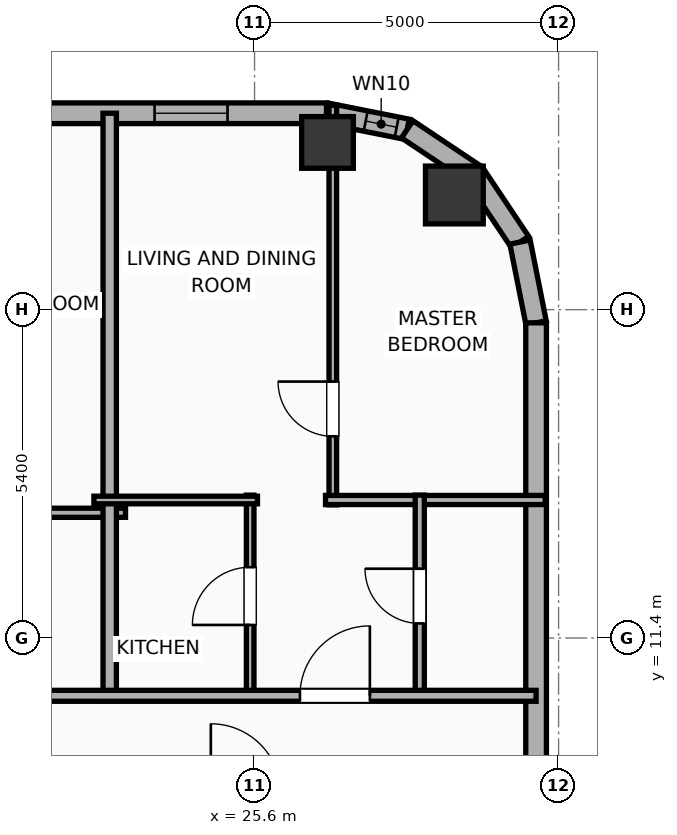
"""IFC4 building model, lengths in metres.
Left out: names, types, materials, properties, quantities, classifications, styles, units other than length and angle.
Written with IfcOpenShell. Run it as: python <this file> out.ifc"""

import sys

from ifc_helpers import new_model, si_unit, direction, frame, frame_2d, origin, origin_2d, place, context, subcontext, project, spatial, rectangle, hollow_rectangle, hollow_circle, extrude, element, fill, save


model = new_model("IFC4")
c1 = context("Model", 3, precision=1e-05, world=origin(), true_north=direction((0.0, 1.0)))
c2 = subcontext(c1, "Body", "Model", "MODEL_VIEW")
j1 = project(units=[si_unit("LENGTHUNIT", "METRE"), si_unit("PLANEANGLEUNIT", "RADIAN")], contexts=[c1])
p1 = place(None, origin())
s1 = spatial("IfcSite", under=j1, at=p1, CompositionType="ELEMENT")
p2 = place(p1, origin())
s2 = spatial("IfcBuilding", under=s1, at=p2, CompositionType="ELEMENT")
p3 = place(p2, frame((0.0, 0.0, 204.1)))
s3 = spatial("IfcBuildingStorey", under=s2, at=p3, CompositionType="ELEMENT", Elevation=204.1)
p4 = place(p3, frame((28.886, 18.686, 0.0), z_axis=(0.0, 0.0, 1.0), x_axis=(1.0, 0.0, 0.0)))
e1 = element("IfcColumn", 1, at=p4, inside=s3, PredefinedType="COLUMN", context=c2, shape_type="SweptSolid", body=[
    extrude(hollow_circle(Radius=0.475, WallThickness=0.032, at=origin_2d()), origin(), (0.0, 0.0, 1.0), 3.9),
])
p5 = place(p3, frame((26.8, 19.55, 0.0), z_axis=(0.0, 0.0, 1.0), x_axis=(1.0, 0.0, 0.0)))
e2 = element("IfcColumn", 2, at=p5, inside=s3, PredefinedType="COLUMN", context=c2, shape_type="SweptSolid", body=[
    extrude(hollow_rectangle(XDim=0.85, YDim=0.85, WallThickness=0.028, at=origin_2d()), origin(), (0.0, 0.0, 1.0), 3.9),
])
p6 = place(p3, frame((-22.783, 20.03, 0.0), z_axis=(0.0, 0.0, 1.0), x_axis=(1.0, 0.0, 0.0)))
e3 = element("IfcWall", 3, at=p6, inside=s3, PredefinedType="ELEMENTEDWALL", context=c2, shape_type="SweptSolid", body=[
    extrude(rectangle(XDim=49.566, YDim=0.34, at=frame_2d((24.783, 0.0))), origin(), (0.0, 0.0, 1.0), 3.65),
])
p7 = place(p6, frame((6.211, 0.0, 0.75)))
e4 = element("IfcOpeningElement", 4, at=p7, cuts=e3, PredefinedType="OPENING", context=c2, shape_type="SweptSolid", body=[
    extrude(rectangle(XDim=2.4, YDim=2.1, at=frame_2d((1.2, 1.05))), frame((0.0, 0.18, 0.0), z_axis=(0.0, -1.0, 0.0), x_axis=(1.0, 0.0, 0.0)), (0.0, 0.0, 1.0), 0.36),
])
p8 = place(p6, frame((22.733, 0.0, 0.75)))
e5 = element("IfcOpeningElement", 5, at=p8, cuts=e3, PredefinedType="OPENING", context=c2, shape_type="SweptSolid", body=[
    extrude(rectangle(XDim=2.4, YDim=2.1, at=frame_2d((1.2, 1.05))), frame((0.0, 0.18, 0.0), z_axis=(0.0, -1.0, 0.0), x_axis=(1.0, 0.0, 0.0)), (0.0, 0.0, 1.0), 0.36),
])
p9 = place(p6, frame((1.132, 0.0, 0.75)))
e6 = element("IfcOpeningElement", 6, at=p9, cuts=e3, PredefinedType="OPENING", context=c2, shape_type="SweptSolid", body=[
    extrude(rectangle(XDim=1.2, YDim=2.05, at=frame_2d((0.6, 1.025))), frame((0.0, 0.18, 0.0), z_axis=(0.0, -1.0, 0.0), x_axis=(1.0, 0.0, 0.0)), (0.0, 0.0, 1.0), 0.36),
])
p10 = place(p6, frame((3.678, 0.0, 0.75)))
e7 = element("IfcOpeningElement", 7, at=p10, cuts=e3, PredefinedType="OPENING", context=c2, shape_type="SweptSolid", body=[
    extrude(rectangle(XDim=1.2, YDim=2.05, at=frame_2d((0.6, 1.025))), frame((0.0, 0.18, 0.0), z_axis=(0.0, -1.0, 0.0), x_axis=(1.0, 0.0, 0.0)), (0.0, 0.0, 1.0), 0.36),
])
p11 = place(p6, frame((14.804, 0.0, 0.75)))
e8 = element("IfcOpeningElement", 8, at=p11, cuts=e3, PredefinedType="OPENING", context=c2, shape_type="SweptSolid", body=[
    extrude(rectangle(XDim=1.2, YDim=2.05, at=frame_2d((0.6, 1.025))), frame((0.0, 0.18, 0.0), z_axis=(0.0, -1.0, 0.0), x_axis=(1.0, 0.0, 0.0)), (0.0, 0.0, 1.0), 0.36),
])
p12 = place(p6, frame((12.054, 0.0, 0.75)))
e9 = element("IfcOpeningElement", 9, at=p12, cuts=e3, PredefinedType="OPENING", context=c2, shape_type="SweptSolid", body=[
    extrude(rectangle(XDim=1.2, YDim=2.05, at=frame_2d((0.6, 1.025))), frame((0.0, 0.18, 0.0), z_axis=(0.0, -1.0, 0.0), x_axis=(1.0, 0.0, 0.0)), (0.0, 0.0, 1.0), 0.36),
])
p13 = place(p6, frame((17.933, 0.0, 0.75)))
e10 = element("IfcOpeningElement", 10, at=p13, cuts=e3, PredefinedType="OPENING", context=c2, shape_type="SweptSolid", body=[
    extrude(rectangle(XDim=1.2, YDim=2.05, at=frame_2d((0.6, 1.025))), frame((0.0, 0.18, 0.0), z_axis=(0.0, -1.0, 0.0), x_axis=(1.0, 0.0, 0.0)), (0.0, 0.0, 1.0), 0.36),
])
p14 = place(p6, frame((26.278, 0.0, 0.75)))
e11 = element("IfcOpeningElement", 11, at=p14, cuts=e3, PredefinedType="OPENING", context=c2, shape_type="SweptSolid", body=[
    extrude(rectangle(XDim=1.2, YDim=2.05, at=frame_2d((0.6, 1.025))), frame((0.0, 0.18, 0.0), z_axis=(0.0, -1.0, 0.0), x_axis=(1.0, 0.0, 0.0)), (0.0, 0.0, 1.0), 0.36),
])
p15 = place(p6, frame((32.677, 0.0, 0.75)))
e12 = element("IfcOpeningElement", 12, at=p15, cuts=e3, PredefinedType="OPENING", context=c2, shape_type="SweptSolid", body=[
    extrude(rectangle(XDim=1.2, YDim=2.05, at=frame_2d((0.6, 1.025))), frame((0.0, 0.18, 0.0), z_axis=(0.0, -1.0, 0.0), x_axis=(1.0, 0.0, 0.0)), (0.0, 0.0, 1.0), 0.36),
])
p16 = place(p6, frame((28.217, 0.0, 0.75)))
e13 = element("IfcOpeningElement", 13, at=p16, cuts=e3, PredefinedType="OPENING", context=c2, shape_type="SweptSolid", body=[
    extrude(rectangle(XDim=0.85, YDim=2.05, at=frame_2d((0.425, 1.025))), frame((0.0, 0.18, 0.0), z_axis=(0.0, -1.0, 0.0), x_axis=(1.0, 0.0, 0.0)), (0.0, 0.0, 1.0), 0.36),
])
p17 = place(p6, frame((36.678, 0.0, 0.75)))
e14 = element("IfcOpeningElement", 14, at=p17, cuts=e3, PredefinedType="OPENING", context=c2, shape_type="SweptSolid", body=[
    extrude(rectangle(XDim=1.2, YDim=2.05, at=frame_2d((0.6, 1.025))), frame((0.0, 0.18, 0.0), z_axis=(0.0, -1.0, 0.0), x_axis=(1.0, 0.0, 0.0)), (0.0, 0.0, 1.0), 0.36),
])
p18 = place(p6, frame((40.307, 0.0, 0.75)))
e15 = element("IfcOpeningElement", 15, at=p18, cuts=e3, PredefinedType="OPENING", context=c2, shape_type="SweptSolid", body=[
    extrude(rectangle(XDim=1.2, YDim=2.05, at=frame_2d((0.6, 1.025))), frame((0.0, 0.18, 0.0), z_axis=(0.0, -1.0, 0.0), x_axis=(1.0, 0.0, 0.0)), (0.0, 0.0, 1.0), 0.36),
])
p19 = place(p6, frame((43.696, 0.0, 0.75)))
e16 = element("IfcOpeningElement", 16, at=p19, cuts=e3, PredefinedType="OPENING", context=c2, shape_type="SweptSolid", body=[
    extrude(rectangle(XDim=1.2, YDim=2.05, at=frame_2d((0.6, 1.025))), frame((0.0, 0.18, 0.0), z_axis=(0.0, -1.0, 0.0), x_axis=(1.0, 0.0, 0.0)), (0.0, 0.0, 1.0), 0.36),
])
p20 = place(p6, frame((46.739, 0.0, 0.75)))
e17 = element("IfcOpeningElement", 17, at=p20, cuts=e3, PredefinedType="OPENING", context=c2, shape_type="SweptSolid", body=[
    extrude(rectangle(XDim=1.2, YDim=2.05, at=frame_2d((0.6, 1.025))), frame((0.0, 0.18, 0.0), z_axis=(0.0, -1.0, 0.0), x_axis=(1.0, 0.0, 0.0)), (0.0, 0.0, 1.0), 0.36),
])
p21 = place(p3, frame((26.783, 20.03, 0.0), z_axis=(0.0, 0.0, 1.0), x_axis=(0.980788153188, -0.195075878998, 0.0)))
e18 = element("IfcWall", 18, at=p21, inside=s3, PredefinedType="ELEMENTEDWALL", context=c2, shape_type="SweptSolid", body=[
    extrude(rectangle(XDim=1.354, YDim=0.34, at=frame_2d((0.677, 0.0))), origin(), (0.0, 0.0, 1.0), 3.65),
])
p22 = place(p21, frame((0.657, 0.0, 0.75)))
e19 = element("IfcOpeningElement", 19, at=p22, cuts=e18, PredefinedType="OPENING", context=c2, shape_type="SweptSolid", body=[
    extrude(rectangle(XDim=0.52, YDim=2.05, at=frame_2d((0.26, 1.025))), frame((0.0, 0.18, 0.0), z_axis=(0.0, -1.0, 0.0), x_axis=(1.0, 0.0, 0.0)), (0.0, 0.0, 1.0), 0.36),
])
for number, where, z_axis, x_axis in (
    (20, (28.111, 19.766, 0.0), (0.0, 0.0, 1.0), (0.831, -0.556, 0.0)),
    (21, (29.223, 19.023, 0.0), (0.0, 0.0, 1.0), (0.556, -0.831, 0.0)),
):
    element("IfcWall", number, at=place(p3, frame(where, z_axis=z_axis, x_axis=x_axis)), inside=s3, PredefinedType="ELEMENTEDWALL", context=c2, shape_type="SweptSolid", body=[
        extrude(rectangle(XDim=1.337, YDim=0.34, at=frame_2d((0.668, 0.0))), origin(), (0.0, 0.0, 1.0), 3.65),
    ])
p23 = place(p3, frame((29.966, 17.911, 0.0), z_axis=(0.0, 0.0, 1.0), x_axis=(0.195075878998, -0.980788153188, 0.0)))
e22 = element("IfcWall", 22, at=p23, inside=s3, PredefinedType="ELEMENTEDWALL", context=c2, shape_type="SweptSolid", body=[
    extrude(rectangle(XDim=1.354, YDim=0.34, at=frame_2d((0.677, 0.0))), origin(), (0.0, 0.0, 1.0), 3.65),
])
p24 = place(p3, frame((30.23, 16.583, 0.0), z_axis=(0.0, 0.0, 1.0), x_axis=(0.0, -1.0, 0.0)))
e23 = element("IfcWall", 23, at=p24, inside=s3, PredefinedType="ELEMENTEDWALL", context=c2, shape_type="SweptSolid", body=[
    extrude(rectangle(XDim=31.967, YDim=0.34, at=frame_2d((15.983, 0.0))), origin(), (0.0, 0.0, 1.0), 3.65),
])
p25 = place(p24, frame((29.924, 0.0, 0.75)))
e24 = element("IfcOpeningElement", 24, at=p25, cuts=e23, PredefinedType="OPENING", context=c2, shape_type="SweptSolid", body=[
    extrude(rectangle(XDim=1.2, YDim=2.05, at=frame_2d((0.6, 1.025))), frame((0.0, 0.18, 0.0), z_axis=(0.0, -1.0, 0.0), x_axis=(1.0, 0.0, 0.0)), (0.0, 0.0, 1.0), 0.36),
])
p26 = place(p24, frame((11.463, 0.0, 0.75)))
e25 = element("IfcOpeningElement", 25, at=p26, cuts=e23, PredefinedType="OPENING", context=c2, shape_type="SweptSolid", body=[
    extrude(rectangle(XDim=1.2, YDim=2.05, at=frame_2d((0.6, 1.025))), frame((0.0, 0.18, 0.0), z_axis=(0.0, -1.0, 0.0), x_axis=(1.0, 0.0, 0.0)), (0.0, 0.0, 1.0), 0.36),
])
p27 = place(p24, frame((20.363, 0.0, 0.75)))
e26 = element("IfcOpeningElement", 26, at=p27, cuts=e23, PredefinedType="OPENING", context=c2, shape_type="SweptSolid", body=[
    extrude(rectangle(XDim=1.2, YDim=2.05, at=frame_2d((0.6, 1.025))), frame((0.0, 0.18, 0.0), z_axis=(0.0, -1.0, 0.0), x_axis=(1.0, 0.0, 0.0)), (0.0, 0.0, 1.0), 0.36),
])
p28 = place(p3, frame((19.688, 13.46, 0.0), z_axis=(0.0, 0.0, 1.0), x_axis=(1.0, 0.0, 0.0)))
e27 = element("IfcWall", 27, at=p28, inside=s3, PredefinedType="PLUMBINGWALL", context=c2, shape_type="SweptSolid", body=[
    extrude(rectangle(XDim=3.79, YDim=0.15, at=frame_2d((1.895, 0.0))), origin(), (0.0, 0.0, 1.0), 3.65),
])
p29 = place(p3, frame((23.218, 10.37, 0.0), z_axis=(0.0, 0.0, 1.0), x_axis=(0.0, 1.0, 0.0)))
e28 = element("IfcWall", 28, at=p29, inside=s3, PredefinedType="PARTITIONING", context=c2, shape_type="SweptSolid", body=[
    extrude(rectangle(XDim=9.66, YDim=0.22, at=frame_2d((4.83, 0.0))), origin(), (0.0, 0.0, 1.0), 3.65),
])
p30 = place(p3, frame((26.887, 13.59, 0.0), z_axis=(0.0, 0.0, 1.0), x_axis=(0.0, 1.0, 0.0)))
e29 = element("IfcWall", 29, at=p30, inside=s3, PredefinedType="PARTITIONING", context=c2, shape_type="SweptSolid", body=[
    extrude(rectangle(XDim=6.572, YDim=0.125, at=frame_2d((3.286, 0.0))), origin(), (0.0, 0.0, 1.0), 3.65),
])
p31 = place(p30, frame((1.127, 0.0, 0.0)))
e30 = element("IfcOpeningElement", 30, at=p31, cuts=e29, PredefinedType="OPENING", context=c2, shape_type="SweptSolid", body=[
    extrude(rectangle(XDim=0.9, YDim=2.05, at=frame_2d((0.45, 1.025))), frame((0.0, 0.073, 0.0), z_axis=(0.0, -1.0, 0.0), x_axis=(1.0, 0.0, 0.0)), (0.0, 0.0, 1.0), 0.145),
])
p32 = place(p3, frame((26.767, 13.67, 0.0), z_axis=(0.0, 0.0, 1.0), x_axis=(1.0, 0.0, 0.0)))
e31 = element("IfcWall", 31, at=p32, inside=s3, PredefinedType="PLUMBINGWALL", context=c2, shape_type="SweptSolid", body=[
    extrude(rectangle(XDim=3.613, YDim=0.15, at=frame_2d((1.806, 0.0))), origin(), (0.0, 0.0, 1.0), 3.65),
])
p33 = place(p3, frame((25.528, 10.43, 0.0), z_axis=(0.0, 0.0, 1.0), x_axis=(0.0, 1.0, 0.0)))
e32 = element("IfcWall", 32, at=p33, inside=s3, PredefinedType="PARTITIONING", context=c2, shape_type="SweptSolid", body=[
    extrude(rectangle(XDim=3.32, YDim=0.125, at=frame_2d((1.66, 0.0))), origin(), (0.0, 0.0, 1.0), 3.65),
])
p34 = place(p33, frame((1.185, 0.0, 0.0)))
e33 = element("IfcOpeningElement", 33, at=p34, cuts=e32, PredefinedType="OPENING", context=c2, shape_type="SweptSolid", body=[
    extrude(rectangle(XDim=0.95, YDim=2.05, at=frame_2d((0.475, 1.025))), frame((0.0, 0.073, 0.0), z_axis=(0.0, -1.0, 0.0), x_axis=(1.0, 0.0, 0.0)), (0.0, 0.0, 1.0), 0.145),
])
p35 = place(p3, frame((22.958, 13.67, 0.0), z_axis=(0.0, 0.0, 1.0), x_axis=(1.0, 0.0, 0.0)))
e34 = element("IfcWall", 34, at=p35, inside=s3, PredefinedType="PARTITIONING", context=c2, shape_type="SweptSolid", body=[
    extrude(rectangle(XDim=2.69, YDim=0.125, at=frame_2d((1.345, 0.0))), origin(), (0.0, 0.0, 1.0), 3.65),
])
p36 = place(p3, frame((28.317, 10.43, 0.0), z_axis=(0.0, 0.0, 1.0), x_axis=(0.0, 1.0, 0.0)))
e35 = element("IfcWall", 35, at=p36, inside=s3, PredefinedType="PLUMBINGWALL", context=c2, shape_type="SweptSolid", body=[
    extrude(rectangle(XDim=3.32, YDim=0.15, at=frame_2d((1.66, 0.0))), origin(), (0.0, 0.0, 1.0), 3.65),
])
p37 = place(p36, frame((1.21, 0.0, 0.0)))
e36 = element("IfcOpeningElement", 36, at=p37, cuts=e35, PredefinedType="OPENING", context=c2, shape_type="SweptSolid", body=[
    extrude(rectangle(XDim=0.9, YDim=2.05, at=frame_2d((0.45, 1.025))), frame((0.0, 0.085, 0.0), z_axis=(0.0, -1.0, 0.0), x_axis=(1.0, 0.0, 0.0)), (0.0, 0.0, 1.0), 0.17),
])
p38 = place(p3, frame((-26.23, 10.45, 0.0), z_axis=(0.0, 0.0, 1.0), x_axis=(1.0, 0.0, 0.0)))
e37 = element("IfcWall", 37, at=p38, inside=s3, PredefinedType="PARTITIONING", context=c2, shape_type="SweptSolid", body=[
    extrude(rectangle(XDim=56.46, YDim=0.18, at=frame_2d((28.23, 0.0))), origin(), (0.0, 0.0, 1.0), 3.65),
])
p39 = place(p38, frame((4.41, 0.0, 0.0)))
e38 = element("IfcOpeningElement", 38, at=p39, cuts=e37, PredefinedType="OPENING", context=c2, shape_type="SweptSolid", body=[
    extrude(rectangle(XDim=1.15, YDim=2.05, at=frame_2d((0.575, 1.025))), frame((0.0, 0.1, 0.0), z_axis=(0.0, -1.0, 0.0), x_axis=(1.0, 0.0, 0.0)), (0.0, 0.0, 1.0), 0.2),
])
p40 = place(p38, frame((11.943, 0.0, 0.0)))
e39 = element("IfcOpeningElement", 39, at=p40, cuts=e37, PredefinedType="OPENING", context=c2, shape_type="SweptSolid", body=[
    extrude(rectangle(XDim=0.9, YDim=2.05, at=frame_2d((0.45, 1.025))), frame((0.0, 0.1, 0.0), z_axis=(0.0, -1.0, 0.0), x_axis=(1.0, 0.0, 0.0)), (0.0, 0.0, 1.0), 0.2),
])
p41 = place(p38, frame((18.243, 0.0, 0.0)))
e40 = element("IfcOpeningElement", 40, at=p41, cuts=e37, PredefinedType="OPENING", context=c2, shape_type="SweptSolid", body=[
    extrude(rectangle(XDim=1.15, YDim=2.05, at=frame_2d((0.575, 1.025))), frame((0.0, 0.1, 0.0), z_axis=(0.0, -1.0, 0.0), x_axis=(1.0, 0.0, 0.0)), (0.0, 0.0, 1.0), 0.2),
])
p42 = place(p38, frame((22.941, 0.0, 0.0)))
e41 = element("IfcOpeningElement", 41, at=p42, cuts=e37, PredefinedType="OPENING", context=c2, shape_type="SweptSolid", body=[
    extrude(rectangle(XDim=0.9, YDim=2.05, at=frame_2d((0.45, 1.025))), frame((0.0, 0.1, 0.0), z_axis=(0.0, -1.0, 0.0), x_axis=(1.0, 0.0, 0.0)), (0.0, 0.0, 1.0), 0.2),
])
p43 = place(p38, frame((27.028, 0.0, 0.0)))
e42 = element("IfcOpeningElement", 42, at=p43, cuts=e37, PredefinedType="OPENING", context=c2, shape_type="SweptSolid", body=[
    extrude(rectangle(XDim=1.15, YDim=2.05, at=frame_2d((0.575, 1.025))), frame((0.0, 0.1, 0.0), z_axis=(0.0, -1.0, 0.0), x_axis=(1.0, 0.0, 0.0)), (0.0, 0.0, 1.0), 0.2),
])
p44 = place(p38, frame((36.864, 0.0, 0.0)))
e43 = element("IfcOpeningElement", 43, at=p44, cuts=e37, PredefinedType="OPENING", context=c2, shape_type="SweptSolid", body=[
    extrude(rectangle(XDim=1.15, YDim=2.05, at=frame_2d((0.575, 1.025))), frame((0.0, 0.1, 0.0), z_axis=(0.0, -1.0, 0.0), x_axis=(1.0, 0.0, 0.0)), (0.0, 0.0, 1.0), 0.2),
])
p45 = place(p38, frame((45.655, 0.0, 0.0)))
e44 = element("IfcOpeningElement", 44, at=p45, cuts=e37, PredefinedType="OPENING", context=c2, shape_type="SweptSolid", body=[
    extrude(rectangle(XDim=0.9, YDim=2.05, at=frame_2d((0.45, 1.025))), frame((0.0, 0.1, 0.0), z_axis=(0.0, -1.0, 0.0), x_axis=(1.0, 0.0, 0.0)), (0.0, 0.0, 1.0), 0.2),
])
p46 = place(p38, frame((52.576, 0.0, 0.0)))
e45 = element("IfcOpeningElement", 45, at=p46, cuts=e37, PredefinedType="OPENING", context=c2, shape_type="SweptSolid", body=[
    extrude(rectangle(XDim=1.15, YDim=2.05, at=frame_2d((0.575, 1.025))), frame((0.0, 0.1, 0.0), z_axis=(0.0, -1.0, 0.0), x_axis=(1.0, 0.0, 0.0)), (0.0, 0.0, 1.0), 0.2),
])
p47 = place(p20, origin())
e46 = element("IfcWindow", 46, at=p47, inside=s3, PartitioningType="SINGLE_PANEL", PredefinedType="WINDOW", context=c2, shape_type="SweptSolid", body=[
    extrude(rectangle(XDim=1.2, YDim=2.05, at=frame_2d((0.6, 1.025))), frame((0.0, 0.03, 0.0), z_axis=(0.0, -1.0, 0.0), x_axis=(1.0, 0.0, 0.0)), (0.0, 0.0, 1.0), 0.06),
])
fill(e17, e46)
p48 = place(p22, origin())
e47 = element("IfcWindow", 47, at=p48, inside=s3, PartitioningType="SINGLE_PANEL", PredefinedType="WINDOW", context=c2, shape_type="SweptSolid", body=[
    extrude(rectangle(XDim=0.52, YDim=2.05, at=frame_2d((0.26, 1.025))), frame((0.0, 0.03, 0.0), z_axis=(0.0, -1.0, 0.0), x_axis=(1.0, 0.0, 0.0)), (0.0, 0.0, 1.0), 0.06),
])
fill(e19, e47)
p49 = place(p31, origin())
e48 = element("IfcDoor", 48, at=p49, inside=s3, OperationType="SINGLE_SWING_RIGHT", PredefinedType="DOOR", context=c2, shape_type="SweptSolid", body=[
    extrude(rectangle(XDim=0.9, YDim=2.05, at=frame_2d((0.45, 1.025))), frame((0.0, 0.025, 0.0), z_axis=(0.0, -1.0, 0.0), x_axis=(1.0, 0.0, 0.0)), (0.0, 0.0, 1.0), 0.05),
])
fill(e30, e48)
p50 = place(p34, origin())
e49 = element("IfcDoor", 49, at=p50, inside=s3, OperationType="SINGLE_SWING_LEFT", PredefinedType="DOOR", context=c2, shape_type="SweptSolid", body=[
    extrude(rectangle(XDim=0.95, YDim=2.05, at=frame_2d((0.475, 1.025))), frame((0.0, 0.025, 0.0), z_axis=(0.0, -1.0, 0.0), x_axis=(1.0, 0.0, 0.0)), (0.0, 0.0, 1.0), 0.05),
])
fill(e33, e49)
p51 = place(p37, origin())
e50 = element("IfcDoor", 50, at=p51, inside=s3, OperationType="SINGLE_SWING_RIGHT", PredefinedType="DOOR", context=c2, shape_type="SweptSolid", body=[
    extrude(rectangle(XDim=0.9, YDim=2.05, at=frame_2d((0.45, 1.025))), frame((0.0, 0.025, 0.0), z_axis=(0.0, -1.0, 0.0), x_axis=(1.0, 0.0, 0.0)), (0.0, 0.0, 1.0), 0.05),
])
fill(e36, e50)
p52 = place(p46, origin())
e51 = element("IfcDoor", 51, at=p52, inside=s3, OperationType="SINGLE_SWING_RIGHT", PredefinedType="DOOR", context=c2, shape_type="SweptSolid", body=[
    extrude(rectangle(XDim=1.15, YDim=2.05, at=frame_2d((0.575, 1.025))), frame((0.0, 0.025, 0.0), z_axis=(0.0, -1.0, 0.0), x_axis=(1.0, 0.0, 0.0)), (0.0, 0.0, 1.0), 0.05),
])
fill(e45, e51)
save(model, sys.argv[1])
